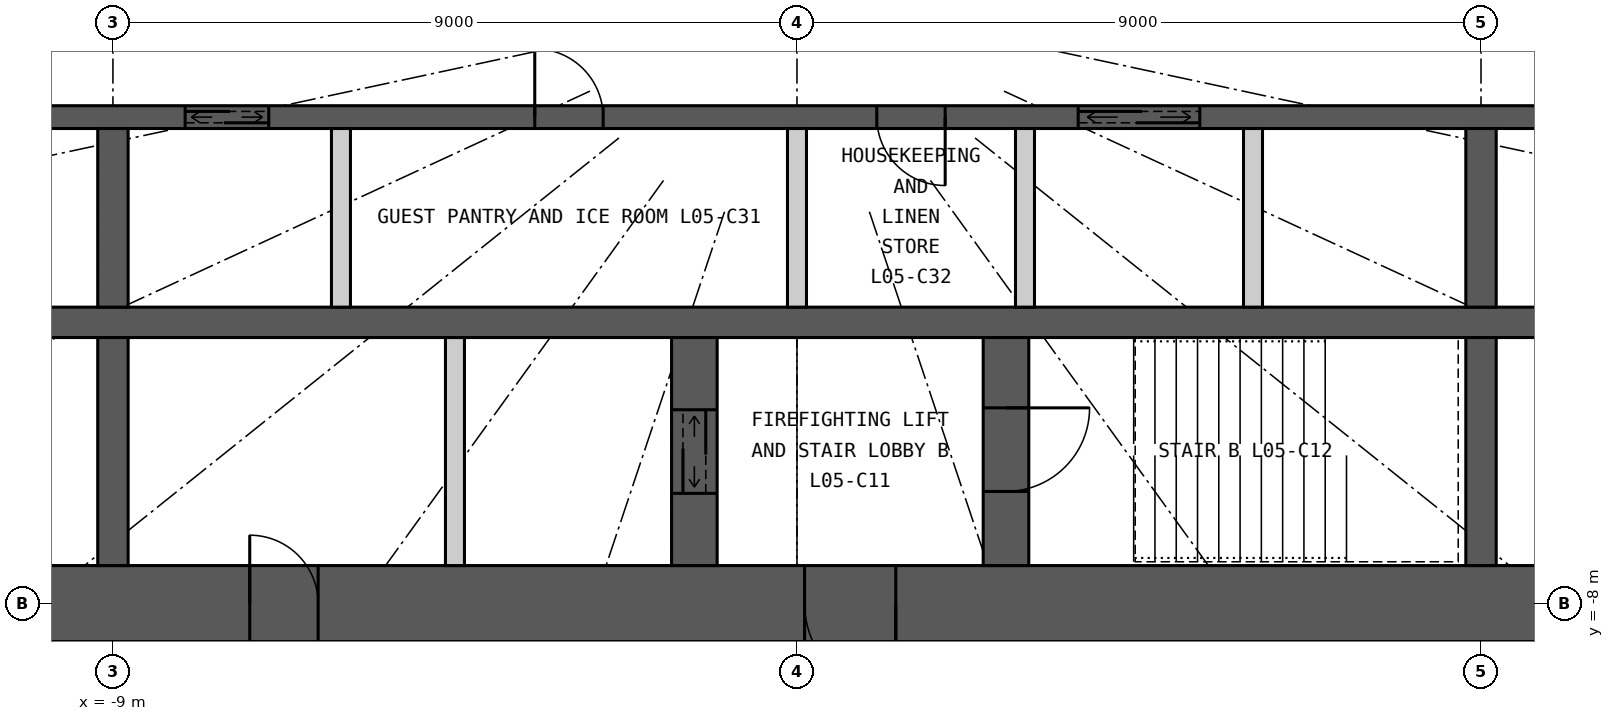
"""IFC4 building model, lengths in metres.
Left out: names, types, materials, properties, quantities, classifications, styles, units other than length and angle.
Written with IfcOpenShell. Run it as: python <this file> out.ifc"""

import sys

from ifc_helpers import new_model, si_unit, direction, frame, frame_2d, origin, place, context, subcontext, project, spatial, rectangle, extrude, element, fill, save


model = new_model("IFC4")
c1 = context("Model", 3, precision=1e-05, world=origin(), true_north=direction((0.0, 1.0)))
c2 = subcontext(c1, "Body", "Model", "MODEL_VIEW")
j1 = project(units=[si_unit("LENGTHUNIT", "METRE"), si_unit("PLANEANGLEUNIT", "RADIAN")], contexts=[c1])
p1 = place(None, origin())
s1 = spatial("IfcSite", under=j1, at=p1, CompositionType="ELEMENT")
p2 = place(p1, origin())
s2 = spatial("IfcBuilding", under=s1, at=p2, CompositionType="ELEMENT")
p3 = place(p2, frame((0.0, 0.0, 29.4)))
s3 = spatial("IfcBuildingStorey", under=s2, at=p3, CompositionType="ELEMENT", Elevation=29.4)
p4 = place(p3, frame((12.5, -8.0, 0.0), z_axis=(0.0, 0.0, 1.0), x_axis=(-1.0, 0.0, 0.0)))
e1 = element("IfcWall", 1, at=p4, inside=s3, PredefinedType="SHEAR", context=c2, shape_type="SweptSolid", body=[
    extrude(rectangle(XDim=25.0, YDim=1.0, at=frame_2d((12.5, 0.0))), origin(), (0.0, 0.0, 1.0), 3.3),
])
p5 = place(p4, frame((11.2, 0.0, 0.0)))
e2 = element("IfcOpeningElement", 2, at=p5, cuts=e1, PredefinedType="OPENING", context=c2, shape_type="SweptSolid", body=[
    extrude(rectangle(XDim=1.2, YDim=2.2, at=frame_2d((0.6, 1.1))), frame((0.0, 0.51, 0.0), z_axis=(0.0, -1.0, 0.0), x_axis=(1.0, 0.0, 0.0)), (0.0, 0.0, 1.0), 1.02),
])
p6 = place(p4, frame((18.8, 0.0, 0.0)))
e3 = element("IfcOpeningElement", 3, at=p6, cuts=e1, PredefinedType="OPENING", context=c2, shape_type="SweptSolid", body=[
    extrude(rectangle(XDim=0.9, YDim=2.2, at=frame_2d((0.45, 1.1))), frame((0.0, 0.51, 0.0), z_axis=(0.0, -1.0, 0.0), x_axis=(1.0, 0.0, 0.0)), (0.0, 0.0, 1.0), 1.02),
])
p7 = place(p3, frame((-11.5, -4.3, 0.0), z_axis=(0.0, 0.0, 1.0), x_axis=(1.0, 0.0, 0.0)))
e4 = element("IfcWall", 4, at=p7, inside=s3, PredefinedType="SHEAR", context=c2, shape_type="SweptSolid", body=[
    extrude(rectangle(XDim=23.0, YDim=0.4, at=frame_2d((11.5, 0.0))), origin(), (0.0, 0.0, 1.0), 3.3),
])
p8 = place(p3, frame((-11.5, -1.6, 0.0), z_axis=(0.0, 0.0, 1.0), x_axis=(1.0, 0.0, 0.0)))
e5 = element("IfcWall", 5, at=p8, inside=s3, PredefinedType="SHEAR", context=c2, shape_type="SweptSolid", body=[
    extrude(rectangle(XDim=23.0, YDim=0.3, at=frame_2d((11.5, 0.0))), origin(), (0.0, 0.0, 1.0), 3.3),
])
p9 = place(p8, frame((0.45, 0.0, 0.0)))
e6 = element("IfcOpeningElement", 6, at=p9, cuts=e5, PredefinedType="OPENING", context=c2, shape_type="SweptSolid", body=[
    extrude(rectangle(XDim=1.1, YDim=2.2, at=frame_2d((0.55, 1.1))), frame((0.0, 0.16, 0.0), z_axis=(0.0, -1.0, 0.0), x_axis=(1.0, 0.0, 0.0)), (0.0, 0.0, 1.0), 0.32),
])
p10 = place(p8, frame((3.45, 0.0, 0.0)))
e7 = element("IfcOpeningElement", 7, at=p10, cuts=e5, PredefinedType="OPENING", context=c2, shape_type="SweptSolid", body=[
    extrude(rectangle(XDim=1.1, YDim=2.2, at=frame_2d((0.55, 1.1))), frame((0.0, 0.16, 0.0), z_axis=(0.0, -1.0, 0.0), x_axis=(1.0, 0.0, 0.0)), (0.0, 0.0, 1.0), 0.32),
])
p11 = place(p8, frame((15.2, 0.0, 0.0)))
e8 = element("IfcOpeningElement", 8, at=p11, cuts=e5, PredefinedType="OPENING", context=c2, shape_type="SweptSolid", body=[
    extrude(rectangle(XDim=1.6, YDim=2.4, at=frame_2d((0.8, 1.2))), frame((0.0, 0.16, 0.0), z_axis=(0.0, -1.0, 0.0), x_axis=(1.0, 0.0, 0.0)), (0.0, 0.0, 1.0), 0.32),
])
p12 = place(p8, frame((8.05, 0.0, 0.0)))
e9 = element("IfcOpeningElement", 9, at=p12, cuts=e5, PredefinedType="OPENING", context=c2, shape_type="SweptSolid", body=[
    extrude(rectangle(XDim=0.9, YDim=2.2, at=frame_2d((0.45, 1.1))), frame((0.0, 0.16, 0.0), z_axis=(0.0, -1.0, 0.0), x_axis=(1.0, 0.0, 0.0)), (0.0, 0.0, 1.0), 0.32),
])
p13 = place(p8, frame((12.55, 0.0, 0.0)))
e10 = element("IfcOpeningElement", 10, at=p13, cuts=e5, PredefinedType="OPENING", context=c2, shape_type="SweptSolid", body=[
    extrude(rectangle(XDim=0.9, YDim=2.2, at=frame_2d((0.45, 1.1))), frame((0.0, 0.16, 0.0), z_axis=(0.0, -1.0, 0.0), x_axis=(1.0, 0.0, 0.0)), (0.0, 0.0, 1.0), 0.32),
])
p14 = place(p3, frame((-9.0, -4.1, 0.0), z_axis=(0.0, 0.0, 1.0), x_axis=(0.0, 1.0, 0.0)))
e11 = element("IfcWall", 11, at=p14, inside=s3, PredefinedType="SHEAR", context=c2, shape_type="SweptSolid", body=[
    extrude(rectangle(XDim=2.35, YDim=0.4, at=frame_2d((1.175, 0.0))), origin(), (0.0, 0.0, 1.0), 3.3),
])
p15 = place(p3, frame((-9.0, -7.5, 0.0), z_axis=(0.0, 0.0, 1.0), x_axis=(0.0, 1.0, 0.0)))
e12 = element("IfcWall", 12, at=p15, inside=s3, PredefinedType="SHEAR", context=c2, shape_type="SweptSolid", body=[
    extrude(rectangle(XDim=3.0, YDim=0.4, at=frame_2d((1.5, 0.0))), origin(), (0.0, 0.0, 1.0), 3.3),
])
p16 = place(p3, frame((9.0, -4.1, 0.0), z_axis=(0.0, 0.0, 1.0), x_axis=(0.0, 1.0, 0.0)))
e13 = element("IfcWall", 13, at=p16, inside=s3, PredefinedType="SHEAR", context=c2, shape_type="SweptSolid", body=[
    extrude(rectangle(XDim=2.35, YDim=0.4, at=frame_2d((1.175, 0.0))), origin(), (0.0, 0.0, 1.0), 3.3),
])
p17 = place(p3, frame((9.0, -7.5, 0.0), z_axis=(0.0, 0.0, 1.0), x_axis=(0.0, 1.0, 0.0)))
e14 = element("IfcWall", 14, at=p17, inside=s3, PredefinedType="SHEAR", context=c2, shape_type="SweptSolid", body=[
    extrude(rectangle(XDim=3.0, YDim=0.4, at=frame_2d((1.5, 0.0))), origin(), (0.0, 0.0, 1.0), 3.3),
])
p18 = place(p3, frame((2.75, -7.5, 0.0), z_axis=(0.0, 0.0, 1.0), x_axis=(0.0, 1.0, 0.0)))
e15 = element("IfcWall", 15, at=p18, inside=s3, PredefinedType="SHEAR", context=c2, shape_type="SweptSolid", body=[
    extrude(rectangle(XDim=3.0, YDim=0.6, at=frame_2d((1.5, 0.0))), origin(), (0.0, 0.0, 1.0), 3.3),
])
p19 = place(p18, frame((0.975, 0.0, 0.0)))
e16 = element("IfcOpeningElement", 16, at=p19, cuts=e15, PredefinedType="OPENING", context=c2, shape_type="SweptSolid", body=[
    extrude(rectangle(XDim=1.1, YDim=2.2, at=frame_2d((0.55, 1.1))), frame((0.0, 0.31, 0.0), z_axis=(0.0, -1.0, 0.0), x_axis=(1.0, 0.0, 0.0)), (0.0, 0.0, 1.0), 0.62),
])
p20 = place(p3, frame((-1.35, -7.5, 0.0), z_axis=(0.0, 0.0, 1.0), x_axis=(0.0, 1.0, 0.0)))
e17 = element("IfcWall", 17, at=p20, inside=s3, PredefinedType="SHEAR", context=c2, shape_type="SweptSolid", body=[
    extrude(rectangle(XDim=3.0, YDim=0.6, at=frame_2d((1.5, 0.0))), origin(), (0.0, 0.0, 1.0), 3.3),
])
p21 = place(p20, frame((0.95, 0.0, 0.0)))
e18 = element("IfcOpeningElement", 18, at=p21, cuts=e17, PredefinedType="OPENING", context=c2, shape_type="SweptSolid", body=[
    extrude(rectangle(XDim=1.1, YDim=2.2, at=frame_2d((0.55, 1.1))), frame((0.0, 0.31, 0.0), z_axis=(0.0, -1.0, 0.0), x_axis=(1.0, 0.0, 0.0)), (0.0, 0.0, 1.0), 0.62),
])
p22 = place(p3, frame((-4.5, -7.5, 0.0), z_axis=(0.0, 0.0, 1.0), x_axis=(0.0, 1.0, 0.0)))
e19 = element("IfcWall", 19, at=p22, inside=s3, PredefinedType="PARTITIONING", context=c2, shape_type="SweptSolid", body=[
    extrude(rectangle(XDim=3.0, YDim=0.25, at=frame_2d((1.5, 0.0))), origin(), (0.0, 0.0, 1.0), 3.3),
])
for number, where, z_axis, x_axis in (
    (20, (-6.0, -4.1, 0.0), (0.0, 0.0, 1.0), (0.0, 1.0, 0.0)),
    (21, (0.0, -4.1, 0.0), (0.0, 0.0, 1.0), (0.0, 1.0, 0.0)),
    (22, (3.0, -4.1, 0.0), (0.0, 0.0, 1.0), (0.0, 1.0, 0.0)),
    (23, (6.0, -4.1, 0.0), (0.0, 0.0, 1.0), (0.0, 1.0, 0.0)),
):
    element("IfcWall", number, at=place(p3, frame(where, z_axis=z_axis, x_axis=x_axis)), inside=s3, PredefinedType="PARTITIONING", context=c2, shape_type="SweptSolid", body=[
        extrude(rectangle(XDim=2.35, YDim=0.25, at=frame_2d((1.175, 0.0))), origin(), (0.0, 0.0, 1.0), 3.3),
    ])
p23 = place(p5, origin())
e24 = element("IfcDoor", 24, at=p23, inside=s3, OperationType="SINGLE_SWING_LEFT", PredefinedType="DOOR", context=c2, shape_type="SweptSolid", body=[
    extrude(rectangle(XDim=1.2, YDim=2.2, at=frame_2d((0.6, 1.1))), frame((0.0, 0.025, 0.0), z_axis=(0.0, -1.0, 0.0), x_axis=(1.0, 0.0, 0.0)), (0.0, 0.0, 1.0), 0.05),
])
fill(e2, e24)
p24 = place(p19, origin())
e25 = element("IfcDoor", 25, at=p24, inside=s3, OperationType="SINGLE_SWING_RIGHT", PredefinedType="DOOR", context=c2, shape_type="SweptSolid", body=[
    extrude(rectangle(XDim=1.1, YDim=2.2, at=frame_2d((0.55, 1.1))), frame((0.0, 0.025, 0.0), z_axis=(0.0, -1.0, 0.0), x_axis=(1.0, 0.0, 0.0)), (0.0, 0.0, 1.0), 0.05),
])
fill(e16, e25)
p25 = place(p21, origin())
e26 = element("IfcDoor", 26, at=p25, inside=s3, OperationType="DOUBLE_DOOR_SLIDING", PredefinedType="DOOR", context=c2, shape_type="SweptSolid", body=[
    extrude(rectangle(XDim=1.1, YDim=2.2, at=frame_2d((0.55, 1.1))), frame((0.0, 0.025, 0.0), z_axis=(0.0, -1.0, 0.0), x_axis=(1.0, 0.0, 0.0)), (0.0, 0.0, 1.0), 0.05),
])
fill(e18, e26)
p26 = place(p6, origin())
e27 = element("IfcDoor", 27, at=p26, inside=s3, OperationType="SINGLE_SWING_RIGHT", PredefinedType="DOOR", context=c2, shape_type="SweptSolid", body=[
    extrude(rectangle(XDim=0.9, YDim=2.2, at=frame_2d((0.45, 1.1))), frame((0.0, 0.025, 0.0), z_axis=(0.0, -1.0, 0.0), x_axis=(1.0, 0.0, 0.0)), (0.0, 0.0, 1.0), 0.05),
])
fill(e3, e27)
p27 = place(p10, origin())
e28 = element("IfcDoor", 28, at=p27, inside=s3, OperationType="DOUBLE_DOOR_SLIDING", PredefinedType="DOOR", context=c2, shape_type="SweptSolid", body=[
    extrude(rectangle(XDim=1.1, YDim=2.2, at=frame_2d((0.55, 1.1))), frame((0.0, 0.025, 0.0), z_axis=(0.0, -1.0, 0.0), x_axis=(1.0, 0.0, 0.0)), (0.0, 0.0, 1.0), 0.05),
])
fill(e7, e28)
p28 = place(p11, origin())
e29 = element("IfcDoor", 29, at=p28, inside=s3, OperationType="DOUBLE_DOOR_SLIDING", PredefinedType="DOOR", context=c2, shape_type="SweptSolid", body=[
    extrude(rectangle(XDim=1.6, YDim=2.4, at=frame_2d((0.8, 1.2))), frame((0.0, 0.025, 0.0), z_axis=(0.0, -1.0, 0.0), x_axis=(1.0, 0.0, 0.0)), (0.0, 0.0, 1.0), 0.05),
])
fill(e8, e29)
p29 = place(p12, origin())
e30 = element("IfcDoor", 30, at=p29, inside=s3, OperationType="SINGLE_SWING_LEFT", PredefinedType="DOOR", context=c2, shape_type="SweptSolid", body=[
    extrude(rectangle(XDim=0.9, YDim=2.2, at=frame_2d((0.45, 1.1))), frame((0.0, 0.025, 0.0), z_axis=(0.0, -1.0, 0.0), x_axis=(1.0, 0.0, 0.0)), (0.0, 0.0, 1.0), 0.05),
])
fill(e9, e30)
p30 = place(p13, origin())
e31 = element("IfcDoor", 31, at=p30, inside=s3, OperationType="SINGLE_SWING_RIGHT", PredefinedType="DOOR", context=c2, shape_type="SweptSolid", body=[
    extrude(rectangle(XDim=0.9, YDim=2.2, at=frame_2d((0.45, 1.1))), frame((0.0, 0.025, 0.0), z_axis=(0.0, -1.0, 0.0), x_axis=(1.0, 0.0, 0.0)), (0.0, 0.0, 1.0), 0.05),
])
fill(e10, e31)
save(model, sys.argv[1])
